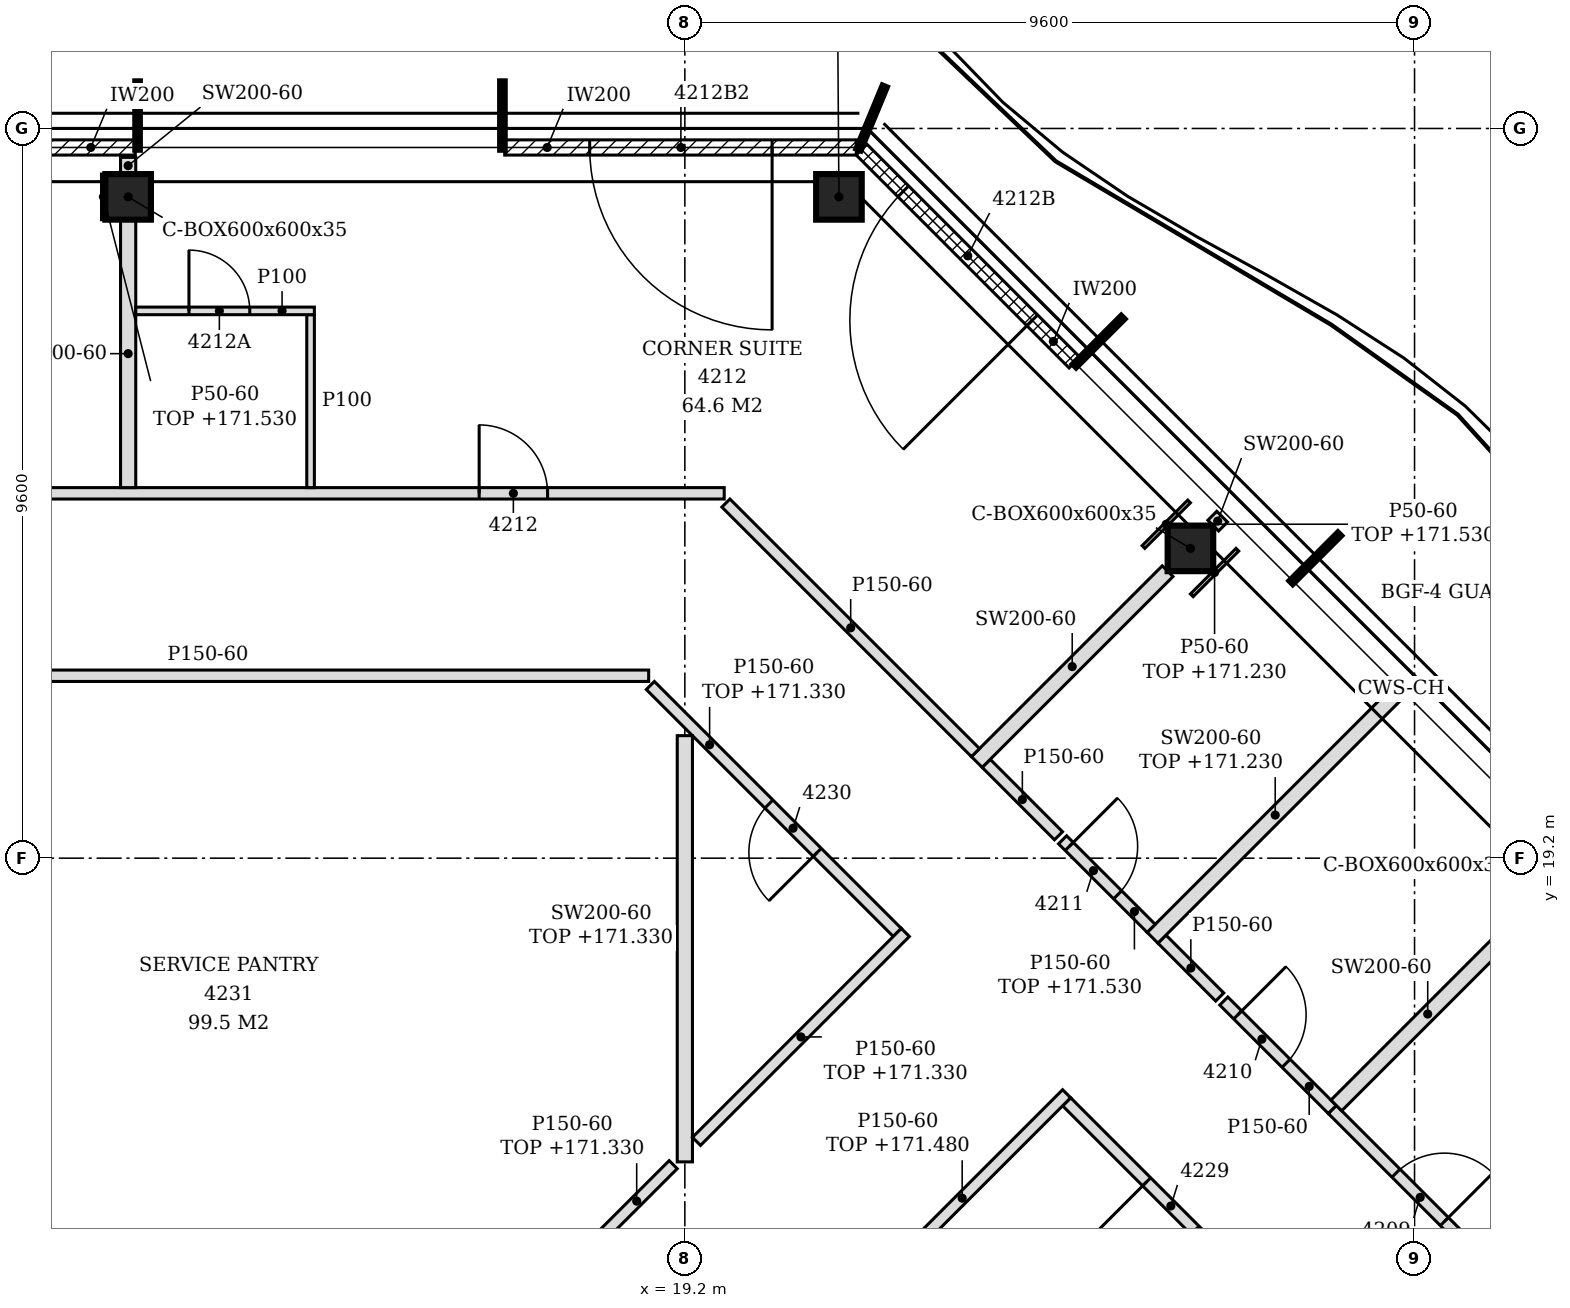
"""IFC4 building model, lengths in metres.
Left out: names, types, materials, properties, quantities, classifications, styles, units other than length and angle.
Written with IfcOpenShell. Run it as: python <this file> out.ifc"""

import sys

from ifc_helpers import new_model, si_unit, direction, frame, frame_2d, origin, origin_2d, place, context, subcontext, project, spatial, polyline, rectangle, hollow_rectangle, outline, extrude, clip, halfspace, element, fill, save


model = new_model("IFC4")
c1 = context("Model", 3, precision=1e-05, world=origin(), true_north=direction((0.0, 1.0)))
c2 = subcontext(c1, "Body", "Model", "MODEL_VIEW")
j1 = project(units=[si_unit("LENGTHUNIT", "METRE"), si_unit("PLANEANGLEUNIT", "RADIAN")], contexts=[c1])
p1 = place(None, origin())
s1 = spatial("IfcSite", under=j1, at=p1, CompositionType="ELEMENT")
p2 = place(p1, origin())
s2 = spatial("IfcBuilding", under=s1, at=p2, CompositionType="ELEMENT")
p3 = place(p2, frame((0.0, 0.0, 168.6)))
s3 = spatial("IfcBuildingStorey", under=s2, at=p3, CompositionType="ELEMENT", Elevation=168.6)
for number, where, z_axis, x_axis in (
    (1, (25.852, 23.276, -0.15), (0.0, 0.0, 1.0), (1.0, 0.0, 0.0)),
    (2, (21.227, 27.9, -0.15), (0.0, 0.0, 1.0), (1.0, 0.0, 0.0)),
    (3, (11.876, 27.9, -0.15), (0.0, 0.0, 1.0), (1.0, 0.0, 0.0)),
):
    element("IfcColumn", number, at=place(p3, frame(where, z_axis=z_axis, x_axis=x_axis)), inside=s3, PredefinedType="COLUMN", context=c2, shape_type="Clipping", body=[
        clip(extrude(hollow_rectangle(XDim=0.6, YDim=0.6, WallThickness=0.035, at=origin_2d()), origin(), (0.0, 0.0, 1.0), 3.6), halfspace(frame((0.0, 0.0, 3.589), z_axis=(0.0, 0.0, 1.0), x_axis=(1.0, 0.0, 0.0)), False)),
    ])
p4 = place(p3, frame((24.326, 25.72, 0.0), z_axis=(0.0, 0.0, 1.0), x_axis=(-0.707106781187, 0.707106781187, 0.0)))
e4 = element("IfcWall", 4, at=p4, inside=s3, PredefinedType="NOTDEFINED", context=c2, shape_type="SweptSolid", body=[
    extrude(rectangle(XDim=3.962, YDim=0.2, at=frame_2d((1.981, 0.0))), origin(), (0.0, 0.0, 1.0), 3.45),
])
p5 = place(p4, frame((0.786, 0.0, 0.0)))
e5 = element("IfcOpeningElement", 5, at=p5, cuts=e4, PredefinedType="OPENING", context=c2, shape_type="SweptSolid", body=[
    extrude(rectangle(XDim=2.4, YDim=2.4, at=frame_2d((1.2, 1.2))), frame((0.0, 0.11, 0.0), z_axis=(0.0, -1.0, 0.0), x_axis=(1.0, 0.0, 0.0)), (0.0, 0.0, 1.0), 0.22),
])
p6 = place(p3, frame((21.457, 28.55, 0.0), z_axis=(0.0, 0.0, 1.0), x_axis=(-1.0, 0.0, 0.0)))
e6 = element("IfcWall", 6, at=p6, inside=s3, PredefinedType="NOTDEFINED", context=c2, shape_type="SweptSolid", body=[
    extrude(rectangle(XDim=4.626, YDim=0.2, at=frame_2d((2.313, 0.0))), origin(), (0.0, 0.0, 1.0), 3.45),
])
p7 = place(p6, frame((1.108, 0.0, 0.0)))
e7 = element("IfcOpeningElement", 7, at=p7, cuts=e6, PredefinedType="OPENING", context=c2, shape_type="SweptSolid", body=[
    extrude(rectangle(XDim=2.4, YDim=2.4, at=frame_2d((1.2, 1.2))), frame((0.0, 0.11, 0.0), z_axis=(0.0, -1.0, 0.0), x_axis=(1.0, 0.0, 0.0)), (0.0, 0.0, 1.0), 0.22),
])
p8 = place(p3, frame((11.97, 28.55, 0.0), z_axis=(0.0, 0.0, 1.0), x_axis=(-1.0, 0.0, 0.0)))
e8 = element("IfcWall", 8, at=p8, inside=s3, PredefinedType="NOTDEFINED", context=c2, shape_type="SweptSolid", body=[
    extrude(rectangle(XDim=4.74, YDim=0.2, at=frame_2d((2.37, 0.0))), origin(), (0.0, 0.0, 1.0), 3.45),
])
p9 = place(p8, frame((1.17, 0.0, 0.0)))
e9 = element("IfcOpeningElement", 9, at=p9, cuts=e8, PredefinedType="OPENING", context=c2, shape_type="SweptSolid", body=[
    extrude(rectangle(XDim=2.4, YDim=2.4, at=frame_2d((1.2, 1.2))), frame((0.0, 0.11, 0.0), z_axis=(0.0, -1.0, 0.0), x_axis=(1.0, 0.0, 0.0)), (0.0, 0.0, 1.0), 0.22),
])
p10 = place(p3, frame((28.672, 11.546, 0.0), z_axis=(0.0, 0.0, 1.0), x_axis=(-0.707106781187, 0.707106781187, 0.0)))
e10 = element("IfcWall", 10, at=p10, inside=s3, PredefinedType="PARTITIONING", context=c2, shape_type="SweptSolid", body=[
    extrude(rectangle(XDim=6.292, YDim=0.15, at=frame_2d((3.146, 0.0))), origin(), (0.0, 0.0, 1.0), 2.88),
])
p11 = place(p10, frame((3.903, 0.0, 0.0)))
e11 = element("IfcOpeningElement", 11, at=p11, cuts=e10, PredefinedType="OPENING", context=c2, shape_type="SweptSolid", body=[
    extrude(rectangle(XDim=0.9, YDim=2.1, at=frame_2d((0.45, 1.05))), frame((0.0, 0.085, 0.0), z_axis=(0.0, -1.0, 0.0), x_axis=(1.0, 0.0, 0.0)), (0.0, 0.0, 1.0), 0.17),
])
p12 = place(p3, frame((31.072, 12.54, 0.0), z_axis=(0.0, 0.0, 1.0), x_axis=(-0.707106781187, 0.707106781187, 0.0)))
e12 = element("IfcWall", 12, at=p12, inside=s3, PredefinedType="PARTITIONING", context=c2, shape_type="SweptSolid", body=[
    extrude(rectangle(XDim=4.743, YDim=0.15, at=frame_2d((2.372, 0.0))), origin(), (0.0, 0.0, 1.0), 2.88),
])
p13 = place(p12, frame((2.658, 0.0, 0.0)))
e13 = element("IfcOpeningElement", 13, at=p13, cuts=e12, PredefinedType="OPENING", context=c2, shape_type="SweptSolid", body=[
    extrude(rectangle(XDim=0.9, YDim=2.1, at=frame_2d((0.45, 1.05))), frame((0.0, 0.085, 0.0), z_axis=(0.0, -1.0, 0.0), x_axis=(1.0, 0.0, 0.0)), (0.0, 0.0, 1.0), 0.17),
])
p14 = place(p3, frame((21.474, 13.353, 0.0), z_axis=(0.0, 0.0, 1.0), x_axis=(0.707200993001, 0.707012556818, 0.0)))
e14 = element("IfcWall", 14, at=p14, inside=s3, PredefinedType="PARTITIONING", context=c2, shape_type="SweptSolid", body=[
    extrude(rectangle(XDim=3.887, YDim=0.15, at=frame_2d((1.943, 0.0))), origin(), (0.0, 0.0, 1.0), 2.88),
])
p15 = place(p3, frame((18.086, 14.208, 0.0), z_axis=(0.0, 0.0, 1.0), x_axis=(0.707466083343, 0.706747296365, 0.0)))
e15 = element("IfcWall", 15, at=p15, inside=s3, PredefinedType="PARTITIONING", context=c2, shape_type="SweptSolid", body=[
    extrude(rectangle(XDim=1.359, YDim=0.15, at=frame_2d((0.679, 0.0))), origin(), (0.0, 0.0, 1.0), 2.73),
])
p16 = place(p3, frame((19.2, 15.205, 0.0), z_axis=(0.0, 0.0, 1.0), x_axis=(0.0, 1.0, 0.0)))
e16 = element("IfcWall", 16, at=p16, inside=s3, PredefinedType="PARTITIONING", context=c2, shape_type="SweptSolid", body=[
    extrude(rectangle(XDim=5.607, YDim=0.2, at=frame_2d((2.804, 0.0))), origin(), (0.0, 0.0, 1.0), 2.73),
])
p17 = place(p3, frame((19.353, 15.474, 0.0), z_axis=(0.0, 0.0, 1.0), x_axis=(0.707012556818, 0.707200993001, 0.0)))
e17 = element("IfcWall", 17, at=p17, inside=s3, PredefinedType="PARTITIONING", context=c2, shape_type="SweptSolid", body=[
    extrude(rectangle(XDim=3.887, YDim=0.15, at=frame_2d((1.943, 0.0))), origin(), (0.0, 0.0, 1.0), 2.73),
])
p18 = place(p3, frame((27.718, 15.894, 0.0), z_axis=(0.0, 0.0, 1.0), x_axis=(-0.707348651109, 0.706864828503, 0.0)))
e18 = element("IfcWall", 18, at=p18, inside=s3, PredefinedType="PARTITIONING", context=c2, shape_type="SweptSolid", body=[
    extrude(rectangle(XDim=2.018, YDim=0.15, at=frame_2d((1.009, 0.0))), origin(), (0.0, 0.0, 1.0), 3.45),
])
p19 = place(p18, frame((0.859, 0.0, 0.0)))
e19 = element("IfcOpeningElement", 19, at=p19, cuts=e18, PredefinedType="OPENING", context=c2, shape_type="SweptSolid", body=[
    extrude(rectangle(XDim=0.9, YDim=2.1, at=frame_2d((0.45, 1.05))), frame((0.0, 0.085, 0.0), z_axis=(0.0, -1.0, 0.0), x_axis=(1.0, 0.0, 0.0)), (0.0, 0.0, 1.0), 0.17),
])
p20 = place(p3, frame((27.771, 15.947, 0.0), z_axis=(0.0, 0.0, 1.0), x_axis=(0.707106781187, 0.707106781187, 0.0)))
e20 = element("IfcWall", 20, at=p20, inside=s3, PredefinedType="PARTITIONING", context=c2, shape_type="SweptSolid", body=[
    extrude(rectangle(XDim=3.401, YDim=0.2, at=frame_2d((1.7, 0.0))), origin(), (0.0, 0.0, 1.0), 3.45),
])
p21 = place(p3, frame((26.237, 17.373, 0.0), z_axis=(0.0, 0.0, 1.0), x_axis=(-0.706198780021, 0.708013617875, 0.0)))
e21 = element("IfcWall", 21, at=p21, inside=s3, PredefinedType="PARTITIONING", context=c2, shape_type="SweptSolid", body=[
    extrude(rectangle(XDim=1.076, YDim=0.15, at=frame_2d((0.538, 0.0))), origin(), (0.0, 0.0, 1.0), 3.45),
])
p22 = place(p3, frame((21.995, 18.223, 0.0), z_axis=(0.0, 0.0, 1.0), x_axis=(-0.707106781187, 0.707106781187, 0.0)))
e22 = element("IfcWall", 22, at=p22, inside=s3, PredefinedType="PARTITIONING", context=c2, shape_type="SweptSolid", body=[
    extrude(rectangle(XDim=4.595, YDim=0.15, at=frame_2d((2.297, 0.0))), origin(), (0.0, 0.0, 1.0), 2.73),
])
p23 = place(p22, frame((1.489, 0.0, 0.0)))
e23 = element("IfcOpeningElement", 23, at=p23, cuts=e22, PredefinedType="OPENING", context=c2, shape_type="SweptSolid", body=[
    extrude(rectangle(XDim=0.9, YDim=2.1, at=frame_2d((0.45, 1.05))), frame((0.0, 0.085, 0.0), z_axis=(0.0, -1.0, 0.0), x_axis=(1.0, 0.0, 0.0)), (0.0, 0.0, 1.0), 0.17),
])
p24 = place(p3, frame((25.353, 18.153, 0.0), z_axis=(0.0, 0.0, 1.0), x_axis=(0.707106781187, 0.707106781187, 0.0)))
e24 = element("IfcWall", 24, at=p24, inside=s3, PredefinedType="PARTITIONING", context=c2, shape_type="SweptSolid", body=[
    extrude(rectangle(XDim=4.565, YDim=0.2, at=frame_2d((2.282, 0.0))), origin(), (0.0, 0.0, 1.0), 2.63),
])
p25 = place(p3, frame((25.335, 18.277, 0.0), z_axis=(0.0, 0.0, 1.0), x_axis=(-0.707254881879, 0.706958649468, 0.0)))
e25 = element("IfcWall", 25, at=p25, inside=s3, PredefinedType="PARTITIONING", context=c2, shape_type="SweptSolid", body=[
    extrude(rectangle(XDim=1.648, YDim=0.15, at=frame_2d((0.824, 0.0))), origin(), (0.0, 0.0, 1.0), 2.93),
])
p26 = place(p25, frame((0.624, 0.0, 0.0)))
e26 = element("IfcOpeningElement", 26, at=p26, cuts=e25, PredefinedType="OPENING", context=c2, shape_type="SweptSolid", body=[
    extrude(rectangle(XDim=0.9, YDim=2.1, at=frame_2d((0.45, 1.05))), frame((0.0, 0.085, 0.0), z_axis=(0.0, -1.0, 0.0), x_axis=(1.0, 0.0, 0.0)), (0.0, 0.0, 1.0), 0.17),
])
p27 = place(p3, frame((24.116, 19.494, 0.0), z_axis=(0.0, 0.0, 1.0), x_axis=(-0.706471832245, 0.707741160485, 0.0)))
e27 = element("IfcWall", 27, at=p27, inside=s3, PredefinedType="PARTITIONING", context=c2, shape_type="SweptSolid", body=[
    extrude(rectangle(XDim=1.346, YDim=0.15, at=frame_2d((0.673, 0.0))), origin(), (0.0, 0.0, 1.0), 3.45),
])
p28 = place(p3, frame((23.041, 20.465, 0.0), z_axis=(0.0, 0.0, 1.0), x_axis=(0.707106781187, 0.707106781187, 0.0)))
e28 = element("IfcWall", 28, at=p28, inside=s3, PredefinedType="PARTITIONING", context=c2, shape_type="SweptSolid", body=[
    extrude(rectangle(XDim=3.55, YDim=0.2, at=frame_2d((1.775, 0.0))), origin(), (0.0, 0.0, 1.0), 3.45),
])
p29 = place(p3, frame((23.023, 20.589, 0.0), z_axis=(0.0, 0.0, 1.0), x_axis=(-0.707106781187, 0.707106781187, 0.0)))
e29 = element("IfcWall", 29, at=p29, inside=s3, PredefinedType="PARTITIONING", context=c2, shape_type="SweptSolid", body=[
    extrude(rectangle(XDim=4.643, YDim=0.15, at=frame_2d((2.322, 0.0))), origin(), (0.0, 0.0, 1.0), 3.45),
])
p30 = place(p3, frame((7.125, 21.6, 0.0), z_axis=(0.0, 0.0, 1.0), x_axis=(1.0, 0.0, 0.0)))
e30 = element("IfcWall", 30, at=p30, inside=s3, PredefinedType="PARTITIONING", context=c2, shape_type="SweptSolid", body=[
    extrude(outline(polyline([(0.0, 0.0), (11.599, 0.0), (11.599, 3.45), (0.225, 3.45), (0.223, 2.73), (0.0, 2.73), (0.0, 0.0)])), frame((0.0, 0.075, 0.0), z_axis=(0.0, -1.0, 0.0), x_axis=(1.0, 0.0, 0.0)), (0.0, 0.0, 1.0), 0.15),
])
p31 = place(p3, frame((26.152, 23.576, 0.0), z_axis=(0.0, 0.0, 1.0), x_axis=(0.707106781187, 0.707106781187, 0.0)))
e31 = element("IfcWall", 31, at=p31, inside=s3, PredefinedType="PARTITIONING", context=c2, shape_type="SweptSolid", body=[
    extrude(rectangle(XDim=0.166, YDim=0.2, at=frame_2d((0.083, 0.0))), origin(), (0.0, 0.0, 1.0), 3.45),
])
p32 = place(p3, frame((-5.318, 24.0, 0.0), z_axis=(0.0, 0.0, 1.0), x_axis=(1.0, 0.0, 0.0)))
e32 = element("IfcWall", 32, at=p32, inside=s3, PredefinedType="PARTITIONING", context=c2, shape_type="SweptSolid", body=[
    extrude(outline(polyline([(0.0, 0.0), (25.036, 0.0), (25.036, 2.88), (24.668, 2.88), (24.666, 2.73), (24.368, 2.73), (24.366, 2.88), (12.668, 2.88), (12.666, 2.73), (12.368, 2.73), (12.366, 2.88), (0.668, 2.88), (0.666, 2.73), (0.368, 2.73), (0.366, 2.88), (0.0, 2.88), (0.0, 0.0)])), frame((0.0, 0.075, 0.0), z_axis=(0.0, -1.0, 0.0), x_axis=(1.0, 0.0, 0.0)), (0.0, 0.0, 1.0), 0.15),
])
p33 = place(p32, frame((21.812, 0.0, 0.0)))
e33 = element("IfcOpeningElement", 33, at=p33, cuts=e32, PredefinedType="OPENING", context=c2, shape_type="SweptSolid", body=[
    extrude(rectangle(XDim=0.9, YDim=2.1, at=frame_2d((0.45, 1.05))), frame((0.0, 0.085, 0.0), z_axis=(0.0, -1.0, 0.0), x_axis=(1.0, 0.0, 0.0)), (0.0, 0.0, 1.0), 0.17),
])
p34 = place(p32, frame((13.268, 0.0, 0.0)))
e34 = element("IfcOpeningElement", 34, at=p34, cuts=e32, PredefinedType="OPENING", context=c2, shape_type="SweptSolid", body=[
    extrude(rectangle(XDim=0.9, YDim=2.1, at=frame_2d((0.45, 1.05))), frame((0.0, 0.085, 0.0), z_axis=(0.0, -1.0, 0.0), x_axis=(1.0, 0.0, 0.0)), (0.0, 0.0, 1.0), 0.17),
])
p35 = place(p32, frame((4.724, 0.0, 0.0)))
e35 = element("IfcOpeningElement", 35, at=p35, cuts=e32, PredefinedType="OPENING", context=c2, shape_type="SweptSolid", body=[
    extrude(rectangle(XDim=0.9, YDim=2.1, at=frame_2d((0.45, 1.05))), frame((0.0, 0.085, 0.0), z_axis=(0.0, -1.0, 0.0), x_axis=(1.0, 0.0, 0.0)), (0.0, 0.0, 1.0), 0.17),
])
p36 = place(p3, frame((11.876, 24.075, 0.0), z_axis=(0.0, 0.0, 1.0), x_axis=(0.0, 1.0, 0.0)))
e36 = element("IfcWall", 36, at=p36, inside=s3, PredefinedType="PARTITIONING", context=c2, shape_type="SweptSolid", body=[
    extrude(outline(polyline([(0.0, 0.0), (3.525, 0.0), (3.525, 3.45), (0.03, 3.45), (0.028, 2.88), (0.0, 2.88), (0.0, 0.0)])), frame((0.0, 0.1, 0.0), z_axis=(0.0, -1.0, 0.0), x_axis=(1.0, 0.0, 0.0)), (0.0, 0.0, 1.0), 0.2),
])
p37 = place(p3, frame((14.276, 24.075, 0.0), z_axis=(0.0, 0.0, 1.0), x_axis=(0.0, 1.0, 0.0)))
e37 = element("IfcWall", 37, at=p37, inside=s3, PredefinedType="PARTITIONING", context=c2, shape_type="SweptSolid", body=[
    extrude(outline(polyline([(0.0, 0.0), (2.275, 0.0), (2.275, 3.45), (0.03, 3.45), (0.028, 2.88), (0.0, 2.88), (0.0, 0.0)])), frame((0.0, 0.05, 0.0), z_axis=(0.0, -1.0, 0.0), x_axis=(1.0, 0.0, 0.0)), (0.0, 0.0, 1.0), 0.1),
])
p38 = place(p3, frame((11.976, 26.4, 0.0), z_axis=(0.0, 0.0, 1.0), x_axis=(1.0, 0.0, 0.0)))
e38 = element("IfcWall", 38, at=p38, inside=s3, PredefinedType="PARTITIONING", context=c2, shape_type="SweptSolid", body=[
    extrude(rectangle(XDim=2.35, YDim=0.1, at=frame_2d((1.175, 0.0))), origin(), (0.0, 0.0, 1.0), 3.45),
])
p39 = place(p38, frame((0.7, 0.0, 0.0)))
e39 = element("IfcOpeningElement", 39, at=p39, cuts=e38, PredefinedType="OPENING", context=c2, shape_type="SweptSolid", body=[
    extrude(rectangle(XDim=0.8, YDim=2.1, at=frame_2d((0.4, 1.05))), frame((0.0, 0.06, 0.0), z_axis=(0.0, -1.0, 0.0), x_axis=(1.0, 0.0, 0.0)), (0.0, 0.0, 1.0), 0.12),
])
p40 = place(p3, frame((11.876, 28.2, 0.0), z_axis=(0.0, 0.0, 1.0), x_axis=(0.0, 1.0, 0.0)))
e40 = element("IfcWall", 40, at=p40, inside=s3, PredefinedType="PARTITIONING", context=c2, shape_type="SweptSolid", body=[
    extrude(rectangle(XDim=0.22, YDim=0.2, at=frame_2d((0.11, 0.0))), origin(), (0.0, 0.0, 1.0), 3.45),
])
p41 = place(p3, frame((25.234, 23.293, 0.0), z_axis=(0.0, 0.0, 1.0), x_axis=(0.707106781187, 0.707106781187, 0.0)))
e41 = element("IfcWall", 41, at=p41, inside=s3, PredefinedType="PARTITIONING", context=c2, shape_type="SweptSolid", body=[
    extrude(rectangle(XDim=0.848, YDim=0.05, at=frame_2d((0.424, 0.0))), origin(), (0.0, 0.0, 1.0), 2.93),
])
p42 = place(p3, frame((25.869, 22.658, 0.0), z_axis=(0.0, 0.0, 1.0), x_axis=(0.707106781187, 0.707106781187, 0.0)))
e42 = element("IfcWall", 42, at=p42, inside=s3, PredefinedType="PARTITIONING", context=c2, shape_type="SweptSolid", body=[
    extrude(rectangle(XDim=0.849, YDim=0.05, at=frame_2d((0.424, 0.0))), origin(), (0.0, 0.0, 1.0), 2.63),
])
p43 = place(p3, frame((11.551, 27.6, 0.0), z_axis=(0.0, 0.0, 1.0), x_axis=(0.0, 1.0, 0.0)))
e43 = element("IfcWall", 43, at=p43, inside=s3, PredefinedType="PARTITIONING", context=c2, shape_type="SweptSolid", body=[
    extrude(rectangle(XDim=0.6, YDim=0.05, at=frame_2d((0.3, 0.0))), origin(), (0.0, 0.0, 1.0), 2.93),
])
p44 = place(p5, origin())
e44 = element("IfcDoor", 44, at=p44, inside=s3, OperationType="SINGLE_SWING_LEFT", PredefinedType="DOOR", context=c2, shape_type="SweptSolid", body=[
    extrude(rectangle(XDim=2.4, YDim=2.4, at=frame_2d((1.2, 1.2))), frame((0.0, 0.025, 0.0), z_axis=(0.0, -1.0, 0.0), x_axis=(1.0, 0.0, 0.0)), (0.0, 0.0, 1.0), 0.05),
])
fill(e5, e44)
p45 = place(p7, origin())
e45 = element("IfcDoor", 45, at=p45, inside=s3, OperationType="SINGLE_SWING_LEFT", PredefinedType="DOOR", context=c2, shape_type="SweptSolid", body=[
    extrude(rectangle(XDim=2.4, YDim=2.4, at=frame_2d((1.2, 1.2))), frame((0.0, 0.025, 0.0), z_axis=(0.0, -1.0, 0.0), x_axis=(1.0, 0.0, 0.0)), (0.0, 0.0, 1.0), 0.05),
])
fill(e7, e45)
p46 = place(p13, frame((0.9, 0.0, 0.0), z_axis=(0.0, 0.0, 1.0), x_axis=(-1.0, 0.0, 0.0)))
e46 = element("IfcDoor", 46, at=p46, inside=s3, OperationType="SINGLE_SWING_RIGHT", PredefinedType="DOOR", context=c2, shape_type="SweptSolid", body=[
    extrude(rectangle(XDim=0.9, YDim=2.1, at=frame_2d((0.45, 1.05))), frame((0.0, 0.025, 0.0), z_axis=(0.0, -1.0, 0.0), x_axis=(1.0, 0.0, 0.0)), (0.0, 0.0, 1.0), 0.05),
])
fill(e13, e46)
p47 = place(p19, frame((0.9, 0.0, 0.0), z_axis=(0.0, 0.0, 1.0), x_axis=(-1.0, 0.0, 0.0)))
e47 = element("IfcDoor", 47, at=p47, inside=s3, OperationType="SINGLE_SWING_LEFT", PredefinedType="DOOR", context=c2, shape_type="SweptSolid", body=[
    extrude(rectangle(XDim=0.9, YDim=2.1, at=frame_2d((0.45, 1.05))), frame((0.0, 0.025, 0.0), z_axis=(0.0, -1.0, 0.0), x_axis=(1.0, 0.0, 0.0)), (0.0, 0.0, 1.0), 0.05),
])
fill(e19, e47)
p48 = place(p26, frame((0.9, 0.0, 0.0), z_axis=(0.0, 0.0, 1.0), x_axis=(-1.0, 0.0, 0.0)))
e48 = element("IfcDoor", 48, at=p48, inside=s3, OperationType="SINGLE_SWING_LEFT", PredefinedType="DOOR", context=c2, shape_type="SweptSolid", body=[
    extrude(rectangle(XDim=0.9, YDim=2.1, at=frame_2d((0.45, 1.05))), frame((0.0, 0.025, 0.0), z_axis=(0.0, -1.0, 0.0), x_axis=(1.0, 0.0, 0.0)), (0.0, 0.0, 1.0), 0.05),
])
fill(e26, e48)
p49 = place(p33, origin())
e49 = element("IfcDoor", 49, at=p49, inside=s3, OperationType="SINGLE_SWING_LEFT", PredefinedType="DOOR", context=c2, shape_type="SweptSolid", body=[
    extrude(rectangle(XDim=0.9, YDim=2.1, at=frame_2d((0.45, 1.05))), frame((0.0, 0.025, 0.0), z_axis=(0.0, -1.0, 0.0), x_axis=(1.0, 0.0, 0.0)), (0.0, 0.0, 1.0), 0.05),
])
fill(e33, e49)
p50 = place(p39, origin())
e50 = element("IfcDoor", 50, at=p50, inside=s3, OperationType="SINGLE_SWING_LEFT", PredefinedType="DOOR", context=c2, shape_type="SweptSolid", body=[
    extrude(rectangle(XDim=0.8, YDim=2.1, at=frame_2d((0.4, 1.05))), frame((0.0, 0.025, 0.0), z_axis=(0.0, -1.0, 0.0), x_axis=(1.0, 0.0, 0.0)), (0.0, 0.0, 1.0), 0.05),
])
fill(e39, e50)
p51 = place(p11, origin())
e51 = element("IfcDoor", 51, at=p51, inside=s3, OperationType="SINGLE_SWING_RIGHT", PredefinedType="DOOR", context=c2, shape_type="SweptSolid", body=[
    extrude(rectangle(XDim=0.9, YDim=2.1, at=frame_2d((0.45, 1.05))), frame((0.0, 0.025, 0.0), z_axis=(0.0, -1.0, 0.0), x_axis=(1.0, 0.0, 0.0)), (0.0, 0.0, 1.0), 0.05),
])
fill(e11, e51)
p52 = place(p23, origin())
e52 = element("IfcDoor", 52, at=p52, inside=s3, OperationType="SINGLE_SWING_LEFT", PredefinedType="DOOR", context=c2, shape_type="SweptSolid", body=[
    extrude(rectangle(XDim=0.9, YDim=2.1, at=frame_2d((0.45, 1.05))), frame((0.0, 0.025, 0.0), z_axis=(0.0, -1.0, 0.0), x_axis=(1.0, 0.0, 0.0)), (0.0, 0.0, 1.0), 0.05),
])
fill(e23, e52)
save(model, sys.argv[1])
